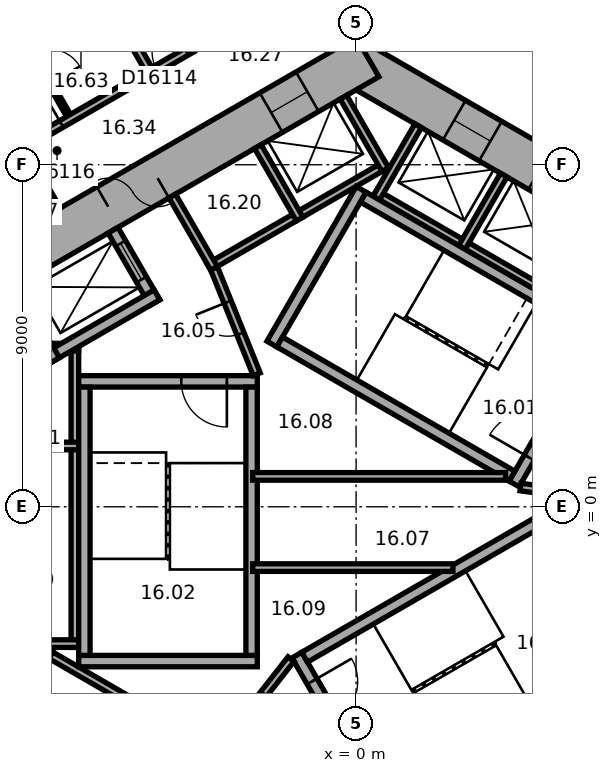
"""IFC4 building model, lengths in metres.
Left out: names, types, materials, properties, quantities, classifications, styles, units other than length and angle.
Written with IfcOpenShell. Run it as: python <this file> out.ifc"""

import sys

from ifc_helpers import new_model, si_unit, direction, frame, frame_2d, origin, place, context, subcontext, project, spatial, rectangle, extrude, element, fill, save


model = new_model("IFC4")
c1 = context("Model", 3, precision=1e-05, world=origin(), true_north=direction((0.0, 1.0)))
c2 = subcontext(c1, "Body", "Model", "MODEL_VIEW")
j1 = project(units=[si_unit("LENGTHUNIT", "METRE"), si_unit("PLANEANGLEUNIT", "RADIAN")], contexts=[c1])
p1 = place(None, origin())
s1 = spatial("IfcSite", under=j1, at=p1, CompositionType="ELEMENT")
p2 = place(p1, origin())
s2 = spatial("IfcBuilding", under=s1, at=p2, CompositionType="ELEMENT")
p3 = place(p2, frame((0.0, 0.0, 73.7)))
s3 = spatial("IfcBuildingStorey", under=s2, at=p3, CompositionType="ELEMENT", Elevation=73.7)
p4 = place(p3, frame((10.4, 5.658, 0.0), z_axis=(0.0, 0.0, 1.0), x_axis=(-0.866021384402, 0.500006961711, 0.0)))
e1 = element("IfcWall", 1, at=p4, inside=s3, PredefinedType="SHEAR", context=c2, shape_type="SweptSolid", body=[
    extrude(rectangle(XDim=12.355, YDim=1.2, at=frame_2d((6.178, 0.0))), origin(), (0.0, 0.0, 1.0), 3.3),
])
p5 = place(p4, frame((2.728, 0.0, 0.0)))
e2 = element("IfcOpeningElement", 2, at=p5, cuts=e1, PredefinedType="OPENING", context=c2, shape_type="SweptSolid", body=[
    extrude(rectangle(XDim=1.1, YDim=2.1, at=frame_2d((0.55, 1.05))), frame((0.0, 0.61, 0.0), z_axis=(0.0, -1.0, 0.0), x_axis=(1.0, 0.0, 0.0)), (0.0, 0.0, 1.0), 1.22),
])
p6 = place(p4, frame((5.328, 0.0, 0.0)))
e3 = element("IfcOpeningElement", 3, at=p6, cuts=e1, PredefinedType="OPENING", context=c2, shape_type="SweptSolid", body=[
    extrude(rectangle(XDim=1.1, YDim=2.1, at=frame_2d((0.55, 1.05))), frame((0.0, 0.61, 0.0), z_axis=(0.0, -1.0, 0.0), x_axis=(1.0, 0.0, 0.0)), (0.0, 0.0, 1.0), 1.22),
])
p7 = place(p4, frame((7.928, 0.0, 0.0)))
e4 = element("IfcOpeningElement", 4, at=p7, cuts=e1, PredefinedType="OPENING", context=c2, shape_type="SweptSolid", body=[
    extrude(rectangle(XDim=1.1, YDim=2.1, at=frame_2d((0.55, 1.05))), frame((0.0, 0.61, 0.0), z_axis=(0.0, -1.0, 0.0), x_axis=(1.0, 0.0, 0.0)), (0.0, 0.0, 1.0), 1.22),
])
p8 = place(p3, frame((0.3, 11.836, 0.0), z_axis=(0.0, 0.0, 1.0), x_axis=(-0.866021384402, -0.500006961711, 0.0)))
e5 = element("IfcWall", 5, at=p8, inside=s3, PredefinedType="SHEAR", context=c2, shape_type="SweptSolid", body=[
    extrude(rectangle(XDim=12.355, YDim=1.2, at=frame_2d((6.178, 0.0))), origin(), (0.0, 0.0, 1.0), 3.3),
])
p9 = place(p8, frame((6.378, 0.0, 0.0)))
e6 = element("IfcOpeningElement", 6, at=p9, cuts=e5, PredefinedType="OPENING", context=c2, shape_type="SweptSolid", body=[
    extrude(rectangle(XDim=1.5, YDim=2.1, at=frame_2d((0.75, 1.05))), frame((0.0, 0.61, 0.0), z_axis=(0.0, -1.0, 0.0), x_axis=(1.0, 0.0, 0.0)), (0.0, 0.0, 1.0), 1.22),
])
p10 = place(p8, frame((1.828, 0.0, 0.0)))
e7 = element("IfcOpeningElement", 7, at=p10, cuts=e5, PredefinedType="OPENING", context=c2, shape_type="SweptSolid", body=[
    extrude(rectangle(XDim=1.1, YDim=2.1, at=frame_2d((0.55, 1.05))), frame((0.0, 0.61, 0.0), z_axis=(0.0, -1.0, 0.0), x_axis=(1.0, 0.0, 0.0)), (0.0, 0.0, 1.0), 1.22),
])
p11 = place(p3, frame((7.424, 4.259, 0.0), z_axis=(0.0, 0.0, 1.0), x_axis=(-0.866026010844, 0.49999894854, 0.0)))
e8 = element("IfcWall", 8, at=p11, inside=s3, PredefinedType="PARTITIONING", context=c2, shape_type="SweptSolid", body=[
    extrude(rectangle(XDim=8.0, YDim=0.2, at=frame_2d((4.0, 0.0))), origin(), (0.0, 0.0, 1.0), 2.95),
])
for number, where, z_axis, x_axis in (
    (9, (2.784, 6.822, 0.0), (0.0, 0.0, 1.0), (0.5, 0.866, 0.0)),
    (10, (0.532, 8.122, 0.0), (0.0, 0.0, 1.0), (0.5, 0.866, 0.0)),
):
    element("IfcWall", number, at=place(p3, frame(where, z_axis=z_axis, x_axis=x_axis)), inside=s3, PredefinedType="PARTITIONING", context=c2, shape_type="SweptSolid", body=[
        extrude(rectangle(XDim=2.2, YDim=0.2, at=frame_2d((1.1, 0.0))), origin(), (0.0, 0.0, 1.0), 2.95),
    ])
p12 = place(p3, frame((0.803, 9.009, 0.0), z_axis=(0.0, 0.0, 1.0), x_axis=(-0.866028230842, -0.499995103361, 0.0)))
e11 = element("IfcWall", 11, at=p12, inside=s3, PredefinedType="PARTITIONING", context=c2, shape_type="SweptSolid", body=[
    extrude(rectangle(XDim=5.4, YDim=0.2, at=frame_2d((2.7, 0.0))), origin(), (0.0, 0.0, 1.0), 2.95),
])
p13 = place(p3, frame((0.767, 8.872, 0.0), z_axis=(0.0, 0.0, 1.0), x_axis=(-0.499994660107, 0.866028486751, 0.0)))
e12 = element("IfcWall", 12, at=p13, inside=s3, PredefinedType="PARTITIONING", context=c2, shape_type="SweptSolid", body=[
    extrude(rectangle(XDim=2.2, YDim=0.2, at=frame_2d((1.1, 0.0))), origin(), (0.0, 0.0, 1.0), 2.95),
])
for number, where, z_axis, x_axis in (
    (13, (-1.485, 7.572, 0.0), (0.0, 0.0, 1.0), (-0.5, 0.866, 0.0)),
    (14, (-3.737, 6.272, 0.0), (0.0, 0.0, 1.0), (-0.5, 0.866, 0.0)),
):
    element("IfcWall", number, at=place(p3, frame(where, z_axis=z_axis, x_axis=x_axis)), inside=s3, PredefinedType="PARTITIONING", context=c2, shape_type="SweptSolid", body=[
        extrude(rectangle(XDim=2.2, YDim=0.2, at=frame_2d((1.1, 0.0))), origin(), (0.0, 0.0, 1.0), 2.95),
    ])
p14 = place(p3, frame((-7.4, 4.3, 0.0), z_axis=(0.0, 0.0, 1.0), x_axis=(0.0, -1.0, 0.0)))
e15 = element("IfcWall", 15, at=p14, inside=s3, PredefinedType="PARTITIONING", context=c2, shape_type="SweptSolid", body=[
    extrude(rectangle(XDim=8.0, YDim=0.2, at=frame_2d((4.0, 0.0))), origin(), (0.0, 0.0, 1.0), 2.95),
])
for number, where, z_axis, x_axis in (
    (16, (-7.3, 4.2, 0.0), (0.0, 0.0, 1.0), (-1.0, 0.0, 0.0)),
    (17, (-7.3, 1.6, 0.0), (0.0, 0.0, 1.0), (-1.0, 0.0, 0.0)),
    (18, (-7.3, -3.6, 0.0), (0.0, 0.0, 1.0), (-1.0, 0.0, 0.0)),
):
    element("IfcWall", number, at=place(p3, frame(where, z_axis=z_axis, x_axis=x_axis)), inside=s3, PredefinedType="PARTITIONING", context=c2, shape_type="SweptSolid", body=[
        extrude(rectangle(XDim=2.2, YDim=0.2, at=frame_2d((1.1, 0.0))), origin(), (0.0, 0.0, 1.0), 2.95),
    ])
p15 = place(p3, frame((-8.203, -3.809, 0.0), z_axis=(0.0, 0.0, 1.0), x_axis=(0.866028230842, -0.499995103361, 0.0)))
e19 = element("IfcWall", 19, at=p15, inside=s3, PredefinedType="PARTITIONING", context=c2, shape_type="SweptSolid", body=[
    extrude(rectangle(XDim=5.4, YDim=0.2, at=frame_2d((2.7, 0.0))), origin(), (0.0, 0.0, 1.0), 2.95),
])
p16 = place(p3, frame((-8.067, -3.772, 0.0), z_axis=(0.0, 0.0, 1.0), x_axis=(-0.50002983664, -0.866008176907, 0.0)))
e20 = element("IfcWall", 20, at=p16, inside=s3, PredefinedType="PARTITIONING", context=c2, shape_type="SweptSolid", body=[
    extrude(rectangle(XDim=2.2, YDim=0.2, at=frame_2d((1.1, 0.0))), origin(), (0.0, 0.0, 1.0), 2.95),
])
p17 = place(p3, frame((-0.024, -8.559, 0.0), z_axis=(0.0, 0.0, 1.0), x_axis=(0.866026010844, 0.49999894854, 0.0)))
e21 = element("IfcWall", 21, at=p17, inside=s3, PredefinedType="PARTITIONING", context=c2, shape_type="SweptSolid", body=[
    extrude(rectangle(XDim=8.0, YDim=0.2, at=frame_2d((4.0, 0.0))), origin(), (0.0, 0.0, 1.0), 2.95),
])
p18 = place(p3, frame((4.158, 0.602, 0.0), z_axis=(0.0, 0.0, 1.0), x_axis=(0.499977259774, 0.866038532462, 0.0)))
e22 = element("IfcWall", 22, at=p18, inside=s3, PredefinedType="SHEAR", context=c2, shape_type="SweptSolid", body=[
    extrude(rectangle(XDim=4.7, YDim=0.3, at=frame_2d((2.35, 0.0))), origin(), (0.0, 0.0, 1.0), 2.95),
])
p19 = place(p18, frame((0.8, 0.0, 0.0)))
e23 = element("IfcOpeningElement", 23, at=p19, cuts=e22, PredefinedType="OPENING", context=c2, shape_type="SweptSolid", body=[
    extrude(rectangle(XDim=1.2, YDim=2.1, at=frame_2d((0.6, 1.05))), frame((0.0, 0.16, 0.0), z_axis=(0.0, -1.0, 0.0), x_axis=(1.0, 0.0, 0.0)), (0.0, 0.0, 1.0), 0.32),
])
p20 = place(p3, frame((-2.216, 4.282, 0.0), z_axis=(0.0, 0.0, 1.0), x_axis=(0.499977259774, 0.866038532462, 0.0)))
e24 = element("IfcWall", 24, at=p20, inside=s3, PredefinedType="SHEAR", context=c2, shape_type="SweptSolid", body=[
    extrude(rectangle(XDim=4.7, YDim=0.3, at=frame_2d((2.35, 0.0))), origin(), (0.0, 0.0, 1.0), 2.95),
])
for number, where, z_axis, x_axis in (
    (25, (4.103, 0.807, 0.0), (0.0, 0.0, 1.0), (-0.866, 0.5, 0.0)),
    (26, (6.303, 4.617, 0.0), (0.0, 0.0, 1.0), (-0.866, 0.5, 0.0)),
):
    element("IfcWall", number, at=place(p3, frame(where, z_axis=z_axis, x_axis=x_axis)), inside=s3, PredefinedType="SHEAR", context=c2, shape_type="SweptSolid", body=[
        extrude(rectangle(XDim=7.06, YDim=0.3, at=frame_2d((3.53, 0.0))), origin(), (0.0, 0.0, 1.0), 2.95),
    ])
p21 = place(p3, frame((-2.6, 3.3, 0.0), z_axis=(0.0, 0.0, 1.0), x_axis=(-1.0, 0.0, 0.0)))
e27 = element("IfcWall", 27, at=p21, inside=s3, PredefinedType="SHEAR", context=c2, shape_type="SweptSolid", body=[
    extrude(rectangle(XDim=4.7, YDim=0.3, at=frame_2d((2.35, 0.0))), origin(), (0.0, 0.0, 1.0), 2.95),
])
p22 = place(p21, frame((0.8, 0.0, 0.0)))
e28 = element("IfcOpeningElement", 28, at=p22, cuts=e27, PredefinedType="OPENING", context=c2, shape_type="SweptSolid", body=[
    extrude(rectangle(XDim=1.2, YDim=2.1, at=frame_2d((0.6, 1.05))), frame((0.0, 0.16, 0.0), z_axis=(0.0, -1.0, 0.0), x_axis=(1.0, 0.0, 0.0)), (0.0, 0.0, 1.0), 0.32),
])
p23 = place(p3, frame((-2.6, -4.06, 0.0), z_axis=(0.0, 0.0, 1.0), x_axis=(-1.0, 0.0, 0.0)))
e29 = element("IfcWall", 29, at=p23, inside=s3, PredefinedType="SHEAR", context=c2, shape_type="SweptSolid", body=[
    extrude(rectangle(XDim=4.7, YDim=0.3, at=frame_2d((2.35, 0.0))), origin(), (0.0, 0.0, 1.0), 2.95),
])
for number, where, z_axis, x_axis in (
    (30, (-2.75, 3.15, 0.0), (0.0, 0.0, 1.0), (0.0, -1.0, 0.0)),
    (31, (-7.15, 3.15, 0.0), (0.0, 0.0, 1.0), (0.0, -1.0, 0.0)),
):
    element("IfcWall", number, at=place(p3, frame(where, z_axis=z_axis, x_axis=x_axis)), inside=s3, PredefinedType="SHEAR", context=c2, shape_type="SweptSolid", body=[
        extrude(rectangle(XDim=7.06, YDim=0.3, at=frame_2d((3.53, 0.0))), origin(), (0.0, 0.0, 1.0), 2.95),
    ])
p24 = place(p3, frame((-1.558, -3.902, 0.0), z_axis=(0.0, 0.0, 1.0), x_axis=(0.499977259774, -0.866038532462, 0.0)))
e32 = element("IfcWall", 32, at=p24, inside=s3, PredefinedType="SHEAR", context=c2, shape_type="SweptSolid", body=[
    extrude(rectangle(XDim=4.7, YDim=0.3, at=frame_2d((2.35, 0.0))), origin(), (0.0, 0.0, 1.0), 2.95),
])
p25 = place(p24, frame((0.8, 0.0, 0.0)))
e33 = element("IfcOpeningElement", 33, at=p25, cuts=e32, PredefinedType="OPENING", context=c2, shape_type="SweptSolid", body=[
    extrude(rectangle(XDim=1.2, YDim=2.1, at=frame_2d((0.6, 1.05))), frame((0.0, 0.16, 0.0), z_axis=(0.0, -1.0, 0.0), x_axis=(1.0, 0.0, 0.0)), (0.0, 0.0, 1.0), 0.32),
])
for number, where, z_axis, x_axis in (
    (34, (-1.353, -3.957, 0.0), (0.0, 0.0, 1.0), (0.866, 0.5, 0.0)),
    (35, (0.847, -7.767, 0.0), (0.0, 0.0, 1.0), (0.866, 0.5, 0.0)),
):
    element("IfcWall", number, at=place(p3, frame(where, z_axis=z_axis, x_axis=x_axis)), inside=s3, PredefinedType="SHEAR", context=c2, shape_type="SweptSolid", body=[
        extrude(rectangle(XDim=7.06, YDim=0.3, at=frame_2d((3.53, 0.0))), origin(), (0.0, 0.0, 1.0), 2.95),
    ])
p26 = place(p3, frame((4.327, 0.521, 0.0), z_axis=(0.0, 0.0, 1.0), x_axis=(0.990124376366, -0.14019172346, 0.0)))
e36 = element("IfcWall", 36, at=p26, inside=s3, PredefinedType="PARTITIONING", context=c2, shape_type="SweptSolid", body=[
    extrude(rectangle(XDim=3.002, YDim=0.2, at=frame_2d((1.501, 0.0))), origin(), (0.0, 0.0, 1.0), 2.95),
])
p27 = place(p26, frame((1.15, 0.0, 0.0)))
e37 = element("IfcOpeningElement", 37, at=p27, cuts=e36, PredefinedType="OPENING", context=c2, shape_type="SweptSolid", body=[
    extrude(rectangle(XDim=0.9, YDim=2.1, at=frame_2d((0.45, 1.05))), frame((0.0, 0.11, 0.0), z_axis=(0.0, -1.0, 0.0), x_axis=(1.0, 0.0, 0.0)), (0.0, 0.0, 1.0), 0.22),
])
p28 = place(p3, frame((-5.295, 5.372, 0.0), z_axis=(0.0, 0.0, 1.0), x_axis=(-0.500077893725, 0.86598042715, 0.0)))
e38 = element("IfcWall", 38, at=p28, inside=s3, PredefinedType="SHEAR", context=c2, shape_type="SweptSolid", body=[
    extrude(rectangle(XDim=2.2, YDim=0.3, at=frame_2d((1.1, 0.0))), origin(), (0.0, 0.0, 1.0), 2.95),
])
p29 = place(p28, frame((0.7, 0.0, 0.0)))
e39 = element("IfcOpeningElement", 39, at=p29, cuts=e38, PredefinedType="OPENING", context=c2, shape_type="SweptSolid", body=[
    extrude(rectangle(XDim=1.1, YDim=2.1, at=frame_2d((0.55, 1.05))), frame((0.0, 0.16, 0.0), z_axis=(0.0, -1.0, 0.0), x_axis=(1.0, 0.0, 0.0)), (0.0, 0.0, 1.0), 0.32),
])
p30 = place(p3, frame((-5.24, 5.577, 0.0), z_axis=(0.0, 0.0, 1.0), x_axis=(-0.866014461049, -0.500018952895, 0.0)))
e40 = element("IfcWall", 40, at=p30, inside=s3, PredefinedType="SHEAR", context=c2, shape_type="SweptSolid", body=[
    extrude(rectangle(XDim=3.35, YDim=0.3, at=frame_2d((1.675, 0.0))), origin(), (0.0, 0.0, 1.0), 2.95),
])
p31 = place(p3, frame((-7.937, 3.847, 0.0), z_axis=(0.0, 0.0, 1.0), x_axis=(-0.50002983664, 0.866008176907, 0.0)))
e41 = element("IfcWall", 41, at=p31, inside=s3, PredefinedType="SHEAR", context=c2, shape_type="SweptSolid", body=[
    extrude(rectangle(XDim=2.2, YDim=0.3, at=frame_2d((1.1, 0.0))), origin(), (0.0, 0.0, 1.0), 2.95),
])
p32 = place(p3, frame((-2.615, 3.487, 0.0), z_axis=(0.0, 0.0, 1.0), x_axis=(-0.373576831041, 0.92759924068, 0.0)))
e42 = element("IfcWall", 42, at=p32, inside=s3, PredefinedType="PARTITIONING", context=c2, shape_type="SweptSolid", body=[
    extrude(rectangle(XDim=3.002, YDim=0.2, at=frame_2d((1.501, 0.0))), origin(), (0.0, 0.0, 1.0), 2.95),
])
p33 = place(p32, frame((1.15, 0.0, 0.0)))
e43 = element("IfcOpeningElement", 43, at=p33, cuts=e42, PredefinedType="OPENING", context=c2, shape_type="SweptSolid", body=[
    extrude(rectangle(XDim=0.9, YDim=2.1, at=frame_2d((0.45, 1.05))), frame((0.0, 0.11, 0.0), z_axis=(0.0, -1.0, 0.0), x_axis=(1.0, 0.0, 0.0)), (0.0, 0.0, 1.0), 0.22),
])
p34 = place(p3, frame((-1.712, -4.008, 0.0), z_axis=(0.0, 0.0, 1.0), x_axis=(-0.616549420702, -0.787316208287, 0.0)))
e44 = element("IfcWall", 44, at=p34, inside=s3, PredefinedType="PARTITIONING", context=c2, shape_type="SweptSolid", body=[
    extrude(rectangle(XDim=3.002, YDim=0.2, at=frame_2d((1.501, 0.0))), origin(), (0.0, 0.0, 1.0), 2.95),
])
p35 = place(p34, frame((1.15, 0.0, 0.0)))
e45 = element("IfcOpeningElement", 45, at=p35, cuts=e44, PredefinedType="OPENING", context=c2, shape_type="SweptSolid", body=[
    extrude(rectangle(XDim=0.9, YDim=2.1, at=frame_2d((0.45, 1.05))), frame((0.0, 0.11, 0.0), z_axis=(0.0, -1.0, 0.0), x_axis=(1.0, 0.0, 0.0)), (0.0, 0.0, 1.0), 0.22),
])
p36 = place(p3, frame((-2.72, -1.6, 0.0), z_axis=(0.0, 0.0, 1.0), x_axis=(1.0, 0.0, 0.0)))
e46 = element("IfcWall", 46, at=p36, inside=s3, PredefinedType="PARTITIONING", context=c2, shape_type="SweptSolid", body=[
    extrude(rectangle(XDim=5.269, YDim=0.2, at=frame_2d((2.634, 0.0))), origin(), (0.0, 0.0, 1.0), 2.95),
])
p37 = place(p3, frame((-2.72, 0.8, 0.0), z_axis=(0.0, 0.0, 1.0), x_axis=(1.0, 0.0, 0.0)))
e47 = element("IfcWall", 47, at=p37, inside=s3, PredefinedType="PARTITIONING", context=c2, shape_type="SweptSolid", body=[
    extrude(rectangle(XDim=6.654, YDim=0.2, at=frame_2d((3.327, 0.0))), origin(), (0.0, 0.0, 1.0), 2.95),
])
p38 = place(p3, frame((-10.083, 19.524, 0.0), z_axis=(0.0, 0.0, 1.0), x_axis=(0.499999662836, -0.866025598446, 0.0)))
e48 = element("IfcWall", 48, at=p38, inside=s3, PredefinedType="PARTITIONING", context=c2, shape_type="SweptSolid", body=[
    extrude(rectangle(XDim=9.25, YDim=0.2, at=frame_2d((4.625, 0.0))), origin(), (0.0, 0.0, 1.0), 2.15),
])
p39 = place(p3, frame((-7.865, 7.814, 0.0), z_axis=(0.0, 0.0, 1.0), x_axis=(-0.500004234368, 0.866022959057, 0.0)))
e49 = element("IfcWall", 49, at=p39, inside=s3, PredefinedType="PARTITIONING", context=c2, shape_type="SweptSolid", body=[
    extrude(rectangle(XDim=11.25, YDim=0.2, at=frame_2d((5.625, 0.0))), origin(), (0.0, 0.0, 1.0), 2.95),
])
p40 = place(p39, frame((0.5, 0.0, 0.0)))
e50 = element("IfcOpeningElement", 50, at=p40, cuts=e49, PredefinedType="OPENING", context=c2, shape_type="SweptSolid", body=[
    extrude(rectangle(XDim=0.9, YDim=2.1, at=frame_2d((0.45, 1.05))), frame((0.0, 0.11, 0.0), z_axis=(0.0, -1.0, 0.0), x_axis=(1.0, 0.0, 0.0)), (0.0, 0.0, 1.0), 0.22),
])
p41 = place(p3, frame((-7.566, 10.296, 0.0), z_axis=(0.0, 0.0, 1.0), x_axis=(-0.499985389037, 0.866033839264, 0.0)))
e51 = element("IfcWall", 51, at=p41, inside=s3, PredefinedType="PARTITIONING", context=c2, shape_type="SweptSolid", body=[
    extrude(rectangle(XDim=2.84, YDim=0.12, at=frame_2d((1.42, 0.0))), origin(), (0.0, 0.0, 1.0), 2.95),
])
p42 = place(p41, frame((0.97, 0.0, 0.0)))
e52 = element("IfcOpeningElement", 52, at=p42, cuts=e51, PredefinedType="OPENING", context=c2, shape_type="SweptSolid", body=[
    extrude(rectangle(XDim=0.9, YDim=2.1, at=frame_2d((0.45, 1.05))), frame((0.0, 0.07, 0.0), z_axis=(0.0, -1.0, 0.0), x_axis=(1.0, 0.0, 0.0)), (0.0, 0.0, 1.0), 0.14),
])
p43 = place(p3, frame((-4.309, 12.061, 0.0), z_axis=(0.0, 0.0, 1.0), x_axis=(-0.866020679205, -0.500008183122, 0.0)))
e53 = element("IfcWall", 53, at=p43, inside=s3, PredefinedType="PARTITIONING", context=c2, shape_type="SweptSolid", body=[
    extrude(rectangle(XDim=5.104, YDim=0.2, at=frame_2d((2.552, 0.0))), origin(), (0.0, 0.0, 1.0), 2.95),
])
p44 = place(p43, frame((0.185, 0.0, 0.0)))
e54 = element("IfcOpeningElement", 54, at=p44, cuts=e53, PredefinedType="OPENING", context=c2, shape_type="SweptSolid", body=[
    extrude(rectangle(XDim=0.9, YDim=2.1, at=frame_2d((0.45, 1.05))), frame((0.0, 0.11, 0.0), z_axis=(0.0, -1.0, 0.0), x_axis=(1.0, 0.0, 0.0)), (0.0, 0.0, 1.0), 0.22),
])
p45 = place(p43, frame((3.979, 0.0, 0.0)))
e55 = element("IfcOpeningElement", 55, at=p45, cuts=e53, PredefinedType="OPENING", context=c2, shape_type="SweptSolid", body=[
    extrude(rectangle(XDim=0.9, YDim=2.1, at=frame_2d((0.45, 1.05))), frame((0.0, 0.11, 0.0), z_axis=(0.0, -1.0, 0.0), x_axis=(1.0, 0.0, 0.0)), (0.0, 0.0, 1.0), 0.22),
])
p46 = place(p3, frame((10.885, 9.652, 0.0), z_axis=(0.0, 0.0, 1.0), x_axis=(-0.866033277307, 0.499986362411, 0.0)))
e56 = element("IfcWall", 56, at=p46, inside=s3, PredefinedType="PARTITIONING", context=c2, shape_type="SweptSolid", body=[
    extrude(rectangle(XDim=8.702, YDim=0.2, at=frame_2d((4.351, 0.0))), origin(), (0.0, 0.0, 1.0), 2.95),
])
p47 = place(p46, frame((3.844, 0.0, 0.0)))
e57 = element("IfcOpeningElement", 57, at=p47, cuts=e56, PredefinedType="OPENING", context=c2, shape_type="SweptSolid", body=[
    extrude(rectangle(XDim=0.9, YDim=2.1, at=frame_2d((0.45, 1.05))), frame((0.0, 0.11, 0.0), z_axis=(0.0, -1.0, 0.0), x_axis=(1.0, 0.0, 0.0)), (0.0, 0.0, 1.0), 0.22),
])
p48 = place(p9, origin())
e58 = element("IfcDoor", 58, at=p48, inside=s3, OperationType="DOUBLE_DOOR_SINGLE_SWING", PredefinedType="DOOR", context=c2, shape_type="SweptSolid", body=[
    extrude(rectangle(XDim=1.5, YDim=2.1, at=frame_2d((0.75, 1.05))), frame((0.0, 0.025, 0.0), z_axis=(0.0, -1.0, 0.0), x_axis=(1.0, 0.0, 0.0)), (0.0, 0.0, 1.0), 0.05),
])
fill(e6, e58)
p49 = place(p19, origin())
e59 = element("IfcDoor", 59, at=p49, inside=s3, OperationType="SINGLE_SWING_RIGHT", PredefinedType="DOOR", context=c2, shape_type="SweptSolid", body=[
    extrude(rectangle(XDim=1.2, YDim=2.1, at=frame_2d((0.6, 1.05))), frame((0.0, 0.025, 0.0), z_axis=(0.0, -1.0, 0.0), x_axis=(1.0, 0.0, 0.0)), (0.0, 0.0, 1.0), 0.05),
])
fill(e23, e59)
p50 = place(p22, origin())
e60 = element("IfcDoor", 60, at=p50, inside=s3, OperationType="SINGLE_SWING_RIGHT", PredefinedType="DOOR", context=c2, shape_type="SweptSolid", body=[
    extrude(rectangle(XDim=1.2, YDim=2.1, at=frame_2d((0.6, 1.05))), frame((0.0, 0.025, 0.0), z_axis=(0.0, -1.0, 0.0), x_axis=(1.0, 0.0, 0.0)), (0.0, 0.0, 1.0), 0.05),
])
fill(e28, e60)
p51 = place(p25, origin())
e61 = element("IfcDoor", 61, at=p51, inside=s3, OperationType="SINGLE_SWING_RIGHT", PredefinedType="DOOR", context=c2, shape_type="SweptSolid", body=[
    extrude(rectangle(XDim=1.2, YDim=2.1, at=frame_2d((0.6, 1.05))), frame((0.0, 0.025, 0.0), z_axis=(0.0, -1.0, 0.0), x_axis=(1.0, 0.0, 0.0)), (0.0, 0.0, 1.0), 0.05),
])
fill(e33, e61)
p52 = place(p33, origin())
e62 = element("IfcDoor", 62, at=p52, inside=s3, OperationType="SINGLE_SWING_LEFT", PredefinedType="DOOR", context=c2, shape_type="SweptSolid", body=[
    extrude(rectangle(XDim=0.9, YDim=2.1, at=frame_2d((0.45, 1.05))), frame((0.0, 0.025, 0.0), z_axis=(0.0, -1.0, 0.0), x_axis=(1.0, 0.0, 0.0)), (0.0, 0.0, 1.0), 0.05),
])
fill(e43, e62)
p53 = place(p35, origin())
e63 = element("IfcDoor", 63, at=p53, inside=s3, OperationType="SINGLE_SWING_LEFT", PredefinedType="DOOR", context=c2, shape_type="SweptSolid", body=[
    extrude(rectangle(XDim=0.9, YDim=2.1, at=frame_2d((0.45, 1.05))), frame((0.0, 0.025, 0.0), z_axis=(0.0, -1.0, 0.0), x_axis=(1.0, 0.0, 0.0)), (0.0, 0.0, 1.0), 0.05),
])
fill(e45, e63)
p54 = place(p29, origin())
e64 = element("IfcDoor", 64, at=p54, inside=s3, OperationType="DOUBLE_DOOR_SLIDING", PredefinedType="DOOR", context=c2, shape_type="SweptSolid", body=[
    extrude(rectangle(XDim=1.1, YDim=2.1, at=frame_2d((0.55, 1.05))), frame((0.0, 0.025, 0.0), z_axis=(0.0, -1.0, 0.0), x_axis=(1.0, 0.0, 0.0)), (0.0, 0.0, 1.0), 0.05),
])
fill(e39, e64)
p55 = place(p7, origin())
e65 = element("IfcDoor", 65, at=p55, inside=s3, OperationType="DOUBLE_DOOR_SLIDING", PredefinedType="DOOR", context=c2, shape_type="SweptSolid", body=[
    extrude(rectangle(XDim=1.1, YDim=2.1, at=frame_2d((0.55, 1.05))), frame((0.0, 0.025, 0.0), z_axis=(0.0, -1.0, 0.0), x_axis=(1.0, 0.0, 0.0)), (0.0, 0.0, 1.0), 0.05),
])
fill(e4, e65)
p56 = place(p10, origin())
e66 = element("IfcDoor", 66, at=p56, inside=s3, OperationType="DOUBLE_DOOR_SLIDING", PredefinedType="DOOR", context=c2, shape_type="SweptSolid", body=[
    extrude(rectangle(XDim=1.1, YDim=2.1, at=frame_2d((0.55, 1.05))), frame((0.0, 0.025, 0.0), z_axis=(0.0, -1.0, 0.0), x_axis=(1.0, 0.0, 0.0)), (0.0, 0.0, 1.0), 0.05),
])
fill(e7, e66)
p57 = place(p44, origin())
e67 = element("IfcDoor", 67, at=p57, inside=s3, OperationType="SINGLE_SWING_LEFT", PredefinedType="DOOR", context=c2, shape_type="SweptSolid", body=[
    extrude(rectangle(XDim=0.9, YDim=2.1, at=frame_2d((0.45, 1.05))), frame((0.0, 0.025, 0.0), z_axis=(0.0, -1.0, 0.0), x_axis=(1.0, 0.0, 0.0)), (0.0, 0.0, 1.0), 0.05),
])
fill(e54, e67)
p58 = place(p45, origin())
e68 = element("IfcDoor", 68, at=p58, inside=s3, OperationType="SINGLE_SWING_LEFT", PredefinedType="DOOR", context=c2, shape_type="SweptSolid", body=[
    extrude(rectangle(XDim=0.9, YDim=2.1, at=frame_2d((0.45, 1.05))), frame((0.0, 0.025, 0.0), z_axis=(0.0, -1.0, 0.0), x_axis=(1.0, 0.0, 0.0)), (0.0, 0.0, 1.0), 0.05),
])
fill(e55, e68)
save(model, sys.argv[1])
